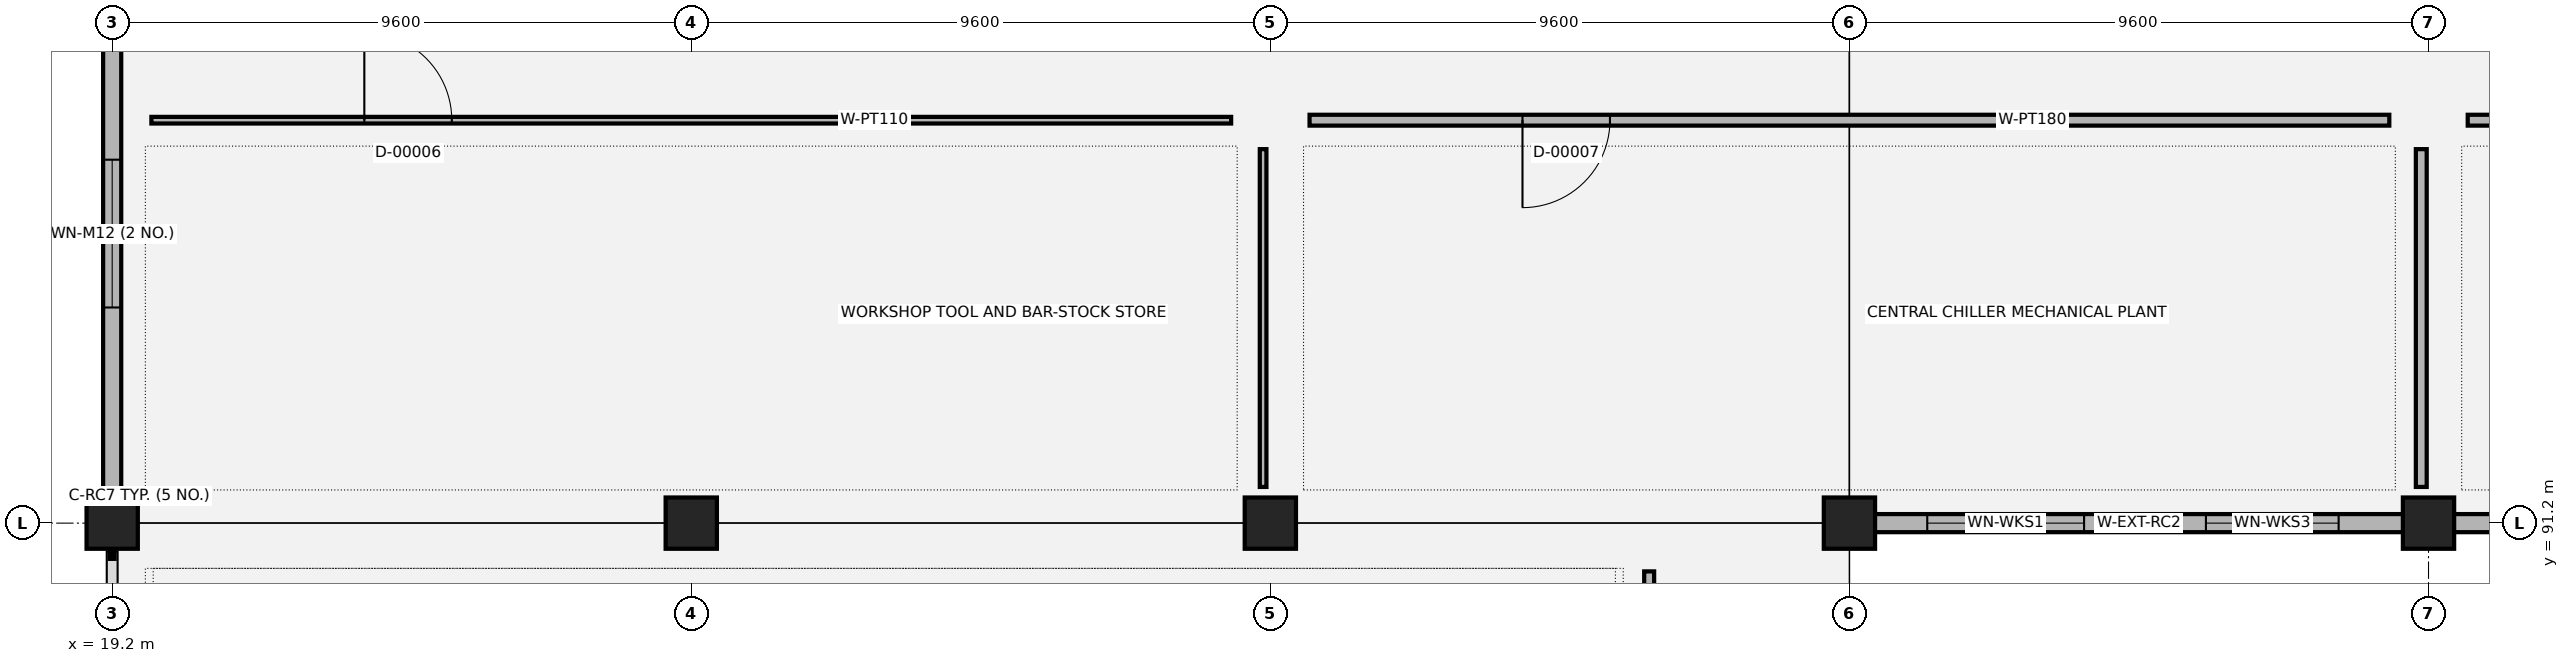
"""IFC4 building model, lengths in metres.
Left out: names, types, materials, properties, quantities, classifications, styles, units other than length and angle.
Written with IfcOpenShell. Run it as: python <this file> out.ifc"""

import sys

from ifc_helpers import new_model, si_unit, direction, frame, frame_2d, origin, origin_2d, place, context, subcontext, project, spatial, rectangle, extrude, element, fill, save


model = new_model("IFC4")
c1 = context("Model", 3, precision=1e-05, world=origin(), true_north=direction((0.0, 1.0)))
c2 = subcontext(c1, "Body", "Model", "MODEL_VIEW")
j1 = project(units=[si_unit("LENGTHUNIT", "METRE"), si_unit("PLANEANGLEUNIT", "RADIAN")], contexts=[c1])
p1 = place(None, origin())
s1 = spatial("IfcSite", under=j1, at=p1, CompositionType="ELEMENT")
p2 = place(p1, origin())
s2 = spatial("IfcBuilding", under=s1, at=p2, CompositionType="ELEMENT")
p3 = place(p2, origin())
s3 = spatial("IfcBuildingStorey", under=s2, at=p3, CompositionType="ELEMENT", Elevation=0.0)
for number, where, z_axis, x_axis in (
    (1, (19.2, 91.2, 0.0), (0.0, 0.0, 1.0), (1.0, 0.0, 0.0)),
    (2, (28.8, 91.2, 0.0), (0.0, 0.0, 1.0), (1.0, 0.0, 0.0)),
    (3, (38.4, 91.2, 0.0), (0.0, 0.0, 1.0), (1.0, 0.0, 0.0)),
    (4, (48.0, 91.2, 0.0), (0.0, 0.0, 1.0), (1.0, 0.0, 0.0)),
    (5, (57.6, 91.2, 0.0), (0.0, 0.0, 1.0), (1.0, 0.0, 0.0)),
):
    element("IfcColumn", number, at=place(p3, frame(where, z_axis=z_axis, x_axis=x_axis)), inside=s3, PredefinedType="COLUMN", context=c2, shape_type="SweptSolid", body=[
        extrude(rectangle(XDim=0.85, YDim=0.85, at=origin_2d()), origin(), (0.0, 0.0, 1.0), 5.4),
    ])
p4 = place(p3, frame((48.38, 91.2, 0.0), z_axis=(0.0, 0.0, 1.0), x_axis=(1.0, 0.0, 0.0)))
e6 = element("IfcWall", 6, at=p4, inside=s3, PredefinedType="SOLIDWALL", context=c2, shape_type="SweptSolid", body=[
    extrude(rectangle(XDim=8.84, YDim=0.3, at=frame_2d((4.42, 0.0))), origin(), (0.0, 0.0, 1.0), 4.04),
])
p5 = place(p4, frame((0.91, 0.0, 0.9)))
e7 = element("IfcOpeningElement", 7, at=p5, cuts=e6, PredefinedType="OPENING", context=c2, shape_type="SweptSolid", body=[
    extrude(rectangle(XDim=2.6, YDim=1.8, at=frame_2d((1.3, 0.9))), frame((0.0, 0.16, 0.0), z_axis=(0.0, -1.0, 0.0), x_axis=(1.0, 0.0, 0.0)), (0.0, 0.0, 1.0), 0.32),
])
p6 = place(p4, frame((5.53, 0.0, 0.9)))
e8 = element("IfcOpeningElement", 8, at=p6, cuts=e6, PredefinedType="OPENING", context=c2, shape_type="SweptSolid", body=[
    extrude(rectangle(XDim=2.2, YDim=1.8, at=frame_2d((1.1, 0.9))), frame((0.0, 0.16, 0.0), z_axis=(0.0, -1.0, 0.0), x_axis=(1.0, 0.0, 0.0)), (0.0, 0.0, 1.0), 0.32),
])
p7 = place(p3, frame((57.98, 91.2, 0.0), z_axis=(0.0, 0.0, 1.0), x_axis=(1.0, 0.0, 0.0)))
e9 = element("IfcWall", 9, at=p7, inside=s3, PredefinedType="SOLIDWALL", context=c2, shape_type="SweptSolid", body=[
    extrude(rectangle(XDim=8.84, YDim=0.3, at=frame_2d((4.42, 0.0))), origin(), (0.0, 0.0, 1.0), 4.04),
])
p8 = place(p7, frame((3.42, 0.0, 0.0)))
e10 = element("IfcOpeningElement", 10, at=p8, cuts=e9, PredefinedType="OPENING", context=c2, shape_type="SweptSolid", body=[
    extrude(rectangle(XDim=2.0, YDim=2.2, at=frame_2d((1.0, 1.1))), frame((0.0, 0.16, 0.0), z_axis=(0.0, -1.0, 0.0), x_axis=(1.0, 0.0, 0.0)), (0.0, 0.0, 1.0), 0.32),
])
p9 = place(p3, frame((19.2, 100.42, 0.0), z_axis=(0.0, 0.0, 1.0), x_axis=(0.0, -1.0, 0.0)))
e11 = element("IfcWall", 11, at=p9, inside=s3, PredefinedType="SOLIDWALL", context=c2, shape_type="SweptSolid", body=[
    extrude(rectangle(XDim=8.84, YDim=0.3, at=frame_2d((4.42, 0.0))), origin(), (0.0, 0.0, 1.0), 4.14),
])
p10 = place(p9, frame((3.195, 0.0, 0.9)))
e12 = element("IfcOpeningElement", 12, at=p10, cuts=e11, PredefinedType="OPENING", context=c2, shape_type="SweptSolid", body=[
    extrude(rectangle(XDim=2.45, YDim=1.7, at=frame_2d((1.225, 0.85))), frame((0.0, 0.16, 0.0), z_axis=(0.0, -1.0, 0.0), x_axis=(1.0, 0.0, 0.0)), (0.0, 0.0, 1.0), 0.32),
])
p11 = place(p3, frame((19.85, 97.88, 0.0), z_axis=(0.0, 0.0, 1.0), x_axis=(1.0, 0.0, 0.0)))
e13 = element("IfcWall", 13, at=p11, inside=s3, PredefinedType="PARTITIONING", context=c2, shape_type="SweptSolid", body=[
    extrude(rectangle(XDim=17.9, YDim=0.11, at=frame_2d((8.95, 0.0))), origin(), (0.0, 0.0, 1.0), 4.04),
])
p12 = place(p11, frame((3.53, 0.0, 0.0)))
e14 = element("IfcOpeningElement", 14, at=p12, cuts=e13, PredefinedType="OPENING", context=c2, shape_type="SweptSolid", body=[
    extrude(rectangle(XDim=1.45, YDim=2.15, at=frame_2d((0.725, 1.075))), frame((0.0, 0.065, 0.0), z_axis=(0.0, -1.0, 0.0), x_axis=(1.0, 0.0, 0.0)), (0.0, 0.0, 1.0), 0.13),
])
p13 = place(p3, frame((38.28, 91.8, 0.0), z_axis=(0.0, 0.0, 1.0), x_axis=(0.0, 1.0, 0.0)))
e15 = element("IfcWall", 15, at=p13, inside=s3, PredefinedType="PARTITIONING", context=c2, shape_type="SweptSolid", body=[
    extrude(rectangle(XDim=5.6, YDim=0.11, at=frame_2d((2.8, 0.0))), origin(), (0.0, 0.0, 1.0), 4.04),
])
p14 = place(p3, frame((39.05, 97.88, 0.0), z_axis=(0.0, 0.0, 1.0), x_axis=(1.0, 0.0, 0.0)))
e16 = element("IfcWall", 16, at=p14, inside=s3, PredefinedType="PARTITIONING", context=c2, shape_type="SweptSolid", body=[
    extrude(rectangle(XDim=17.9, YDim=0.18, at=frame_2d((8.95, 0.0))), origin(), (0.0, 0.0, 1.0), 4.04),
])
p15 = place(p14, frame((3.53, 0.0, 0.0)))
e17 = element("IfcOpeningElement", 17, at=p15, cuts=e16, PredefinedType="OPENING", context=c2, shape_type="SweptSolid", body=[
    extrude(rectangle(XDim=1.45, YDim=2.15, at=frame_2d((0.725, 1.075))), frame((0.0, 0.1, 0.0), z_axis=(0.0, -1.0, 0.0), x_axis=(1.0, 0.0, 0.0)), (0.0, 0.0, 1.0), 0.2),
])
p16 = place(p3, frame((57.48, 91.8, 0.0), z_axis=(0.0, 0.0, 1.0), x_axis=(0.0, 1.0, 0.0)))
e18 = element("IfcWall", 18, at=p16, inside=s3, PredefinedType="PARTITIONING", context=c2, shape_type="SweptSolid", body=[
    extrude(rectangle(XDim=5.6, YDim=0.18, at=frame_2d((2.8, 0.0))), origin(), (0.0, 0.0, 1.0), 4.04),
])
p17 = place(p3, frame((58.25, 97.88, 0.0), z_axis=(0.0, 0.0, 1.0), x_axis=(1.0, 0.0, 0.0)))
e19 = element("IfcWall", 19, at=p17, inside=s3, PredefinedType="PARTITIONING", context=c2, shape_type="SweptSolid", body=[
    extrude(rectangle(XDim=17.9, YDim=0.18, at=frame_2d((8.95, 0.0))), origin(), (0.0, 0.0, 1.0), 4.04),
])
p18 = place(p17, frame((12.92, 0.0, 0.0)))
e20 = element("IfcOpeningElement", 20, at=p18, cuts=e19, PredefinedType="OPENING", context=c2, shape_type="SweptSolid", body=[
    extrude(rectangle(XDim=1.45, YDim=2.15, at=frame_2d((0.725, 1.075))), frame((0.0, 0.1, 0.0), z_axis=(0.0, -1.0, 0.0), x_axis=(1.0, 0.0, 0.0)), (0.0, 0.0, 1.0), 0.2),
])
p19 = place(p3, frame((44.68, 82.2, 0.0), z_axis=(0.0, 0.0, 1.0), x_axis=(0.0, 1.0, 0.0)))
e21 = element("IfcWall", 21, at=p19, inside=s3, PredefinedType="PARTITIONING", context=c2, shape_type="SweptSolid", body=[
    extrude(rectangle(XDim=8.2, YDim=0.165, at=frame_2d((4.1, 0.0))), origin(), (0.0, 0.0, 1.0), 4.04),
])
p20 = place(p5, origin())
e22 = element("IfcWindow", 22, at=p20, inside=s3, PartitioningType="SINGLE_PANEL", PredefinedType="WINDOW", context=c2, shape_type="SweptSolid", body=[
    extrude(rectangle(XDim=2.6, YDim=1.8, at=frame_2d((1.3, 0.9))), frame((0.0, 0.03, 0.0), z_axis=(0.0, -1.0, 0.0), x_axis=(1.0, 0.0, 0.0)), (0.0, 0.0, 1.0), 0.06),
])
fill(e7, e22)
p21 = place(p6, origin())
e23 = element("IfcWindow", 23, at=p21, inside=s3, PartitioningType="SINGLE_PANEL", PredefinedType="WINDOW", context=c2, shape_type="SweptSolid", body=[
    extrude(rectangle(XDim=2.2, YDim=1.8, at=frame_2d((1.1, 0.9))), frame((0.0, 0.03, 0.0), z_axis=(0.0, -1.0, 0.0), x_axis=(1.0, 0.0, 0.0)), (0.0, 0.0, 1.0), 0.06),
])
fill(e8, e23)
p22 = place(p10, origin())
e24 = element("IfcWindow", 24, at=p22, inside=s3, PartitioningType="SINGLE_PANEL", PredefinedType="WINDOW", context=c2, shape_type="SweptSolid", body=[
    extrude(rectangle(XDim=2.45, YDim=1.7, at=frame_2d((1.225, 0.85))), frame((0.0, 0.03, 0.0), z_axis=(0.0, -1.0, 0.0), x_axis=(1.0, 0.0, 0.0)), (0.0, 0.0, 1.0), 0.06),
])
fill(e12, e24)
p23 = place(p12, origin())
e25 = element("IfcDoor", 25, at=p23, inside=s3, OperationType="SINGLE_SWING_LEFT", PredefinedType="DOOR", context=c2, shape_type="SweptSolid", body=[
    extrude(rectangle(XDim=1.45, YDim=2.15, at=frame_2d((0.725, 1.075))), frame((0.0, 0.025, 0.0), z_axis=(0.0, -1.0, 0.0), x_axis=(1.0, 0.0, 0.0)), (0.0, 0.0, 1.0), 0.05),
])
fill(e14, e25)
p24 = place(p15, origin())
e26 = element("IfcDoor", 26, at=p24, inside=s3, OperationType="SINGLE_SWING_RIGHT", PredefinedType="DOOR", context=c2, shape_type="SweptSolid", body=[
    extrude(rectangle(XDim=1.45, YDim=2.15, at=frame_2d((0.725, 1.075))), frame((0.0, 0.025, 0.0), z_axis=(0.0, -1.0, 0.0), x_axis=(1.0, 0.0, 0.0)), (0.0, 0.0, 1.0), 0.05),
])
fill(e17, e26)
save(model, sys.argv[1])
